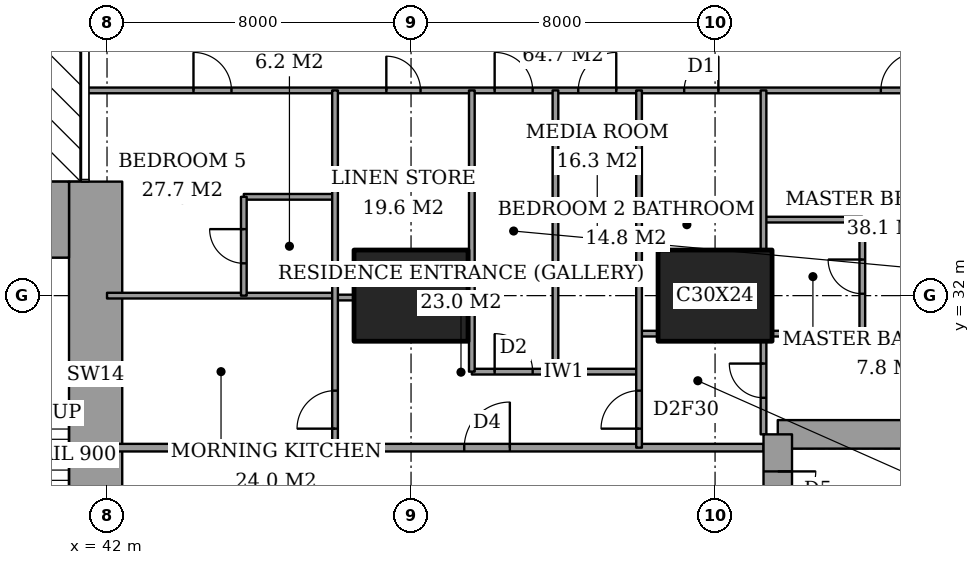
"""IFC4 building model, lengths in metres.
Left out: names, types, materials, properties, quantities, classifications, styles, units other than length and angle.
Written with IfcOpenShell. Run it as: python <this file> out.ifc"""

import sys

from ifc_helpers import new_model, si_unit, direction, frame, frame_2d, origin, origin_2d, place, context, subcontext, project, spatial, rectangle, extrude, element, fill, save


model = new_model("IFC4")
c1 = context("Model", 3, precision=1e-05, world=origin(), true_north=direction((0.0, 1.0)))
c2 = subcontext(c1, "Body", "Model", "MODEL_VIEW")
j1 = project(units=[si_unit("LENGTHUNIT", "METRE"), si_unit("PLANEANGLEUNIT", "RADIAN")], contexts=[c1])
p1 = place(None, origin())
s1 = spatial("IfcSite", under=j1, at=p1, CompositionType="ELEMENT")
p2 = place(p1, origin())
s2 = spatial("IfcBuilding", under=s1, at=p2, CompositionType="ELEMENT")
p3 = place(p2, frame((0.0, 0.0, 182.2)))
s3 = spatial("IfcBuildingStorey", under=s2, at=p3, CompositionType="ELEMENT", Elevation=182.2)
for number, where, z_axis, x_axis in (
    (1, (50.0, 32.0, 0.0), (0.0, 0.0, 1.0), (1.0, 0.0, 0.0)),
    (2, (58.0, 32.0, 0.0), (0.0, 0.0, 1.0), (1.0, 0.0, 0.0)),
):
    element("IfcColumn", number, at=place(p3, frame(where, z_axis=z_axis, x_axis=x_axis)), inside=s3, PredefinedType="COLUMN", context=c2, shape_type="SweptSolid", body=[
        extrude(rectangle(XDim=3.0, YDim=2.4, at=origin_2d()), origin(), (0.0, 0.0, 1.0), 3.6),
    ])
p4 = place(p3, frame((37.85, 34.0, 0.0), z_axis=(0.0, 0.0, 1.0), x_axis=(1.0, 0.0, 0.0)))
e3 = element("IfcWall", 3, at=p4, inside=s3, PredefinedType="SHEAR", context=c2, shape_type="SweptSolid", body=[
    extrude(rectangle(XDim=3.15, YDim=2.0, at=frame_2d((1.575, 0.0))), origin(), (0.0, 0.0, 1.0), 3.6),
])
p5 = place(p3, frame((41.7, 24.85, 0.0), z_axis=(0.0, 0.0, 1.0), x_axis=(0.0, 1.0, 0.0)))
e4 = element("IfcWall", 4, at=p5, inside=s3, PredefinedType="SHEAR", context=c2, shape_type="SweptSolid", body=[
    extrude(rectangle(XDim=10.15, YDim=1.4, at=frame_2d((5.075, 0.0))), origin(), (0.0, 0.0, 1.0), 3.6),
])
p6 = place(p3, frame((64.1, 28.35, 0.0), z_axis=(0.0, 0.0, 1.0), x_axis=(-1.0, 0.0, 0.0)))
e5 = element("IfcWall", 5, at=p6, inside=s3, PredefinedType="SHEAR", context=c2, shape_type="SweptSolid", body=[
    extrude(rectangle(XDim=4.45, YDim=0.75, at=frame_2d((2.225, 0.0))), origin(), (0.0, 0.0, 1.0), 3.6),
])
p7 = place(p3, frame((59.65, 28.35, 0.0), z_axis=(0.0, 0.0, 1.0), x_axis=(0.0, -1.0, 0.0)))
e6 = element("IfcWall", 6, at=p7, inside=s3, PredefinedType="SHEAR", context=c2, shape_type="SweptSolid", body=[
    extrude(rectangle(XDim=8.7, YDim=0.75, at=frame_2d((4.35, 0.0))), origin(), (0.0, 0.0, 1.0), 3.6),
])
p8 = place(p7, frame((0.975, 0.0, 0.0)))
e7 = element("IfcOpeningElement", 7, at=p8, cuts=e6, PredefinedType="OPENING", context=c2, shape_type="SweptSolid", body=[
    extrude(rectangle(XDim=1.0, YDim=2.1, at=frame_2d((0.5, 1.05))), frame((0.0, 0.385, 0.0), z_axis=(0.0, -1.0, 0.0), x_axis=(1.0, 0.0, 0.0)), (0.0, 0.0, 1.0), 0.77),
])
p9 = place(p3, frame((42.0, 28.0, 0.0), z_axis=(0.0, 0.0, 1.0), x_axis=(1.0, 0.0, 0.0)))
e8 = element("IfcWall", 8, at=p9, inside=s3, PredefinedType="PARTITIONING", context=c2, shape_type="SweptSolid", body=[
    extrude(rectangle(XDim=17.275, YDim=0.2, at=frame_2d((8.637, 0.0))), origin(), (0.0, 0.0, 1.0), 3.35),
])
p10 = place(p9, frame((9.4, 0.0, 0.0)))
e9 = element("IfcOpeningElement", 9, at=p10, cuts=e8, PredefinedType="OPENING", context=c2, shape_type="SweptSolid", body=[
    extrude(rectangle(XDim=1.2, YDim=2.4, at=frame_2d((0.6, 1.2))), frame((0.0, 0.11, 0.0), z_axis=(0.0, -1.0, 0.0), x_axis=(1.0, 0.0, 0.0)), (0.0, 0.0, 1.0), 0.22),
])
p11 = place(p3, frame((51.6, 30.0, 0.0), z_axis=(0.0, 0.0, 1.0), x_axis=(1.0, 0.0, 0.0)))
e10 = element("IfcWall", 10, at=p11, inside=s3, PredefinedType="PARTITIONING", context=c2, shape_type="SweptSolid", body=[
    extrude(rectangle(XDim=4.4, YDim=0.15, at=frame_2d((2.2, 0.0))), origin(), (0.0, 0.0, 1.0), 3.35),
])
p12 = place(p11, frame((0.6, 0.0, 0.0)))
e11 = element("IfcOpeningElement", 11, at=p12, cuts=e10, PredefinedType="OPENING", context=c2, shape_type="SweptSolid", body=[
    extrude(rectangle(XDim=1.0, YDim=2.1, at=frame_2d((0.5, 1.05))), frame((0.0, 0.085, 0.0), z_axis=(0.0, -1.0, 0.0), x_axis=(1.0, 0.0, 0.0)), (0.0, 0.0, 1.0), 0.17),
])
p13 = place(p3, frame((56.0, 31.0, 0.0), z_axis=(0.0, 0.0, 1.0), x_axis=(1.0, 0.0, 0.0)))
e12 = element("IfcWall", 12, at=p13, inside=s3, PredefinedType="PARTITIONING", context=c2, shape_type="SweptSolid", body=[
    extrude(rectangle(XDim=0.5, YDim=0.15, at=frame_2d((0.25, 0.0))), origin(), (0.0, 0.0, 1.0), 3.35),
])
p14 = place(p3, frame((59.5, 31.0, 0.0), z_axis=(0.0, 0.0, 1.0), x_axis=(1.0, 0.0, 0.0)))
e13 = element("IfcWall", 13, at=p14, inside=s3, PredefinedType="PARTITIONING", context=c2, shape_type="SweptSolid", body=[
    extrude(rectangle(XDim=6.95, YDim=0.15, at=frame_2d((3.475, 0.0))), origin(), (0.0, 0.0, 1.0), 3.35),
])
p15 = place(p3, frame((48.0, 31.95, 0.0), z_axis=(0.0, 0.0, 1.0), x_axis=(1.0, 0.0, 0.0)))
e14 = element("IfcWall", 14, at=p15, inside=s3, PredefinedType="PARTITIONING", context=c2, shape_type="SweptSolid", body=[
    extrude(rectangle(XDim=0.5, YDim=0.15, at=frame_2d((0.25, 0.0))), origin(), (0.0, 0.0, 1.0), 2.634),
])
p16 = place(p3, frame((42.0, 32.0, 0.0), z_axis=(0.0, 0.0, 1.0), x_axis=(1.0, 0.0, 0.0)))
e15 = element("IfcWall", 15, at=p16, inside=s3, PredefinedType="PARTITIONING", context=c2, shape_type="SweptSolid", body=[
    extrude(rectangle(XDim=6.0, YDim=0.15, at=frame_2d((3.0, 0.0))), origin(), (0.0, 0.0, 1.0), 2.634),
])
p17 = place(p3, frame((59.275, 34.0, 0.0), z_axis=(0.0, 0.0, 1.0), x_axis=(1.0, 0.0, 0.0)))
e16 = element("IfcWall", 16, at=p17, inside=s3, PredefinedType="PARTITIONING", context=c2, shape_type="SweptSolid", body=[
    extrude(rectangle(XDim=2.6, YDim=0.15, at=frame_2d((1.3, 0.0))), origin(), (0.0, 0.0, 1.0), 3.35),
])
p18 = place(p3, frame((45.6, 34.6, 0.0), z_axis=(0.0, 0.0, 1.0), x_axis=(1.0, 0.0, 0.0)))
e17 = element("IfcWall", 17, at=p18, inside=s3, PredefinedType="PARTITIONING", context=c2, shape_type="SweptSolid", body=[
    extrude(rectangle(XDim=2.4, YDim=0.15, at=frame_2d((1.2, 0.0))), origin(), (0.0, 0.0, 1.0), 3.35),
])
p19 = place(p3, frame((41.439, 37.4, 0.0), z_axis=(0.0, 0.0, 1.0), x_axis=(1.0, 0.0, 0.0)))
e18 = element("IfcWall", 18, at=p19, inside=s3, PredefinedType="PARTITIONING", context=c2, shape_type="SweptSolid", body=[
    extrude(rectangle(XDim=25.011, YDim=0.15, at=frame_2d((12.505, 0.0))), origin(), (0.0, 0.0, 1.0), 3.35),
])
p20 = place(p19, frame((10.761, 0.0, 0.0)))
e19 = element("IfcOpeningElement", 19, at=p20, cuts=e18, PredefinedType="OPENING", context=c2, shape_type="SweptSolid", body=[
    extrude(rectangle(XDim=1.0, YDim=2.1, at=frame_2d((0.5, 1.05))), frame((0.0, 0.085, 0.0), z_axis=(0.0, -1.0, 0.0), x_axis=(1.0, 0.0, 0.0)), (0.0, 0.0, 1.0), 0.17),
])
p21 = place(p19, frame((20.924, 0.0, 0.0)))
e20 = element("IfcOpeningElement", 20, at=p21, cuts=e18, PredefinedType="OPENING", context=c2, shape_type="SweptSolid", body=[
    extrude(rectangle(XDim=1.0, YDim=2.1, at=frame_2d((0.5, 1.05))), frame((0.0, 0.085, 0.0), z_axis=(0.0, -1.0, 0.0), x_axis=(1.0, 0.0, 0.0)), (0.0, 0.0, 1.0), 0.17),
])
p22 = place(p19, frame((15.749, 0.0, 0.0)))
e21 = element("IfcOpeningElement", 21, at=p22, cuts=e18, PredefinedType="OPENING", context=c2, shape_type="SweptSolid", body=[
    extrude(rectangle(XDim=0.9, YDim=2.1, at=frame_2d((0.45, 1.05))), frame((0.0, 0.085, 0.0), z_axis=(0.0, -1.0, 0.0), x_axis=(1.0, 0.0, 0.0)), (0.0, 0.0, 1.0), 0.17),
])
p23 = place(p19, frame((12.961, 0.0, 0.0)))
e22 = element("IfcOpeningElement", 22, at=p23, cuts=e18, PredefinedType="OPENING", context=c2, shape_type="SweptSolid", body=[
    extrude(rectangle(XDim=1.0, YDim=2.1, at=frame_2d((0.5, 1.05))), frame((0.0, 0.085, 0.0), z_axis=(0.0, -1.0, 0.0), x_axis=(1.0, 0.0, 0.0)), (0.0, 0.0, 1.0), 0.17),
])
p24 = place(p19, frame((7.911, 0.0, 0.0)))
e23 = element("IfcOpeningElement", 23, at=p24, cuts=e18, PredefinedType="OPENING", context=c2, shape_type="SweptSolid", body=[
    extrude(rectangle(XDim=0.9, YDim=2.1, at=frame_2d((0.45, 1.05))), frame((0.0, 0.085, 0.0), z_axis=(0.0, -1.0, 0.0), x_axis=(1.0, 0.0, 0.0)), (0.0, 0.0, 1.0), 0.17),
])
p25 = place(p19, frame((2.836, 0.0, 0.0)))
e24 = element("IfcOpeningElement", 24, at=p25, cuts=e18, PredefinedType="OPENING", context=c2, shape_type="SweptSolid", body=[
    extrude(rectangle(XDim=1.0, YDim=2.1, at=frame_2d((0.5, 1.05))), frame((0.0, 0.085, 0.0), z_axis=(0.0, -1.0, 0.0), x_axis=(1.0, 0.0, 0.0)), (0.0, 0.0, 1.0), 0.17),
])
p26 = place(p3, frame((45.6, 32.0, 0.0), z_axis=(0.0, 0.0, 1.0), x_axis=(0.0, 1.0, 0.0)))
e25 = element("IfcWall", 25, at=p26, inside=s3, PredefinedType="PARTITIONING", context=c2, shape_type="SweptSolid", body=[
    extrude(rectangle(XDim=2.6, YDim=0.15, at=frame_2d((1.3, 0.0))), origin(), (0.0, 0.0, 1.0), 3.35),
])
p27 = place(p26, frame((0.85, 0.0, 0.0)))
e26 = element("IfcOpeningElement", 26, at=p27, cuts=e25, PredefinedType="OPENING", context=c2, shape_type="SweptSolid", body=[
    extrude(rectangle(XDim=0.9, YDim=2.1, at=frame_2d((0.45, 1.05))), frame((0.0, 0.085, 0.0), z_axis=(0.0, -1.0, 0.0), x_axis=(1.0, 0.0, 0.0)), (0.0, 0.0, 1.0), 0.17),
])
p28 = place(p3, frame((48.0, 28.0, 0.0), z_axis=(0.0, 0.0, 1.0), x_axis=(0.0, 1.0, 0.0)))
e27 = element("IfcWall", 27, at=p28, inside=s3, PredefinedType="PARTITIONING", context=c2, shape_type="SweptSolid", body=[
    extrude(rectangle(XDim=9.4, YDim=0.15, at=frame_2d((4.7, 0.0))), origin(), (0.0, 0.0, 1.0), 3.35),
])
p29 = place(p28, frame((0.5, 0.0, 0.0)))
e28 = element("IfcOpeningElement", 28, at=p29, cuts=e27, PredefinedType="OPENING", context=c2, shape_type="SweptSolid", body=[
    extrude(rectangle(XDim=1.0, YDim=2.1, at=frame_2d((0.5, 1.05))), frame((0.0, 0.085, 0.0), z_axis=(0.0, -1.0, 0.0), x_axis=(1.0, 0.0, 0.0)), (0.0, 0.0, 1.0), 0.17),
])
for number, where, z_axis, x_axis in (
    (29, (51.6, 30.0, 0.0), (0.0, 0.0, 1.0), (0.0, 1.0, 0.0)),
    (30, (53.8, 30.0, 0.0), (0.0, 0.0, 1.0), (0.0, 1.0, 0.0)),
):
    element("IfcWall", number, at=place(p3, frame(where, z_axis=z_axis, x_axis=x_axis)), inside=s3, PredefinedType="PARTITIONING", context=c2, shape_type="SweptSolid", body=[
        extrude(rectangle(XDim=7.4, YDim=0.15, at=frame_2d((3.7, 0.0))), origin(), (0.0, 0.0, 1.0), 3.35),
    ])
p30 = place(p3, frame((56.0, 28.0, 0.0), z_axis=(0.0, 0.0, 1.0), x_axis=(0.0, 1.0, 0.0)))
e31 = element("IfcWall", 31, at=p30, inside=s3, PredefinedType="PARTITIONING", context=c2, shape_type="SweptSolid", body=[
    extrude(rectangle(XDim=9.4, YDim=0.15, at=frame_2d((4.7, 0.0))), origin(), (0.0, 0.0, 1.0), 3.35),
])
p31 = place(p30, frame((0.5, 0.0, 0.0)))
e32 = element("IfcOpeningElement", 32, at=p31, cuts=e31, PredefinedType="OPENING", context=c2, shape_type="SweptSolid", body=[
    extrude(rectangle(XDim=1.0, YDim=2.1, at=frame_2d((0.5, 1.05))), frame((0.0, 0.085, 0.0), z_axis=(0.0, -1.0, 0.0), x_axis=(1.0, 0.0, 0.0)), (0.0, 0.0, 1.0), 0.17),
])
p32 = place(p3, frame((59.275, 28.35, 0.0), z_axis=(0.0, 0.0, 1.0), x_axis=(0.0, 1.0, 0.0)))
e33 = element("IfcWall", 33, at=p32, inside=s3, PredefinedType="PARTITIONING", context=c2, shape_type="SweptSolid", body=[
    extrude(rectangle(XDim=2.45, YDim=0.15, at=frame_2d((1.225, 0.0))), origin(), (0.0, 0.0, 1.0), 3.35),
])
p33 = place(p32, frame((0.962, 0.0, 0.0)))
e34 = element("IfcOpeningElement", 34, at=p33, cuts=e33, PredefinedType="OPENING", context=c2, shape_type="SweptSolid", body=[
    extrude(rectangle(XDim=0.9, YDim=2.1, at=frame_2d((0.45, 1.05))), frame((0.0, 0.085, 0.0), z_axis=(0.0, -1.0, 0.0), x_axis=(1.0, 0.0, 0.0)), (0.0, 0.0, 1.0), 0.17),
])
p34 = place(p3, frame((59.275, 33.2, 0.0), z_axis=(0.0, 0.0, 1.0), x_axis=(0.0, 1.0, 0.0)))
e35 = element("IfcWall", 35, at=p34, inside=s3, PredefinedType="PARTITIONING", context=c2, shape_type="SweptSolid", body=[
    extrude(rectangle(XDim=4.2, YDim=0.15, at=frame_2d((2.1, 0.0))), origin(), (0.0, 0.0, 1.0), 3.35),
])
p35 = place(p3, frame((61.875, 31.0, 0.0), z_axis=(0.0, 0.0, 1.0), x_axis=(0.0, 1.0, 0.0)))
e36 = element("IfcWall", 36, at=p35, inside=s3, PredefinedType="PARTITIONING", context=c2, shape_type="SweptSolid", body=[
    extrude(rectangle(XDim=3.0, YDim=0.15, at=frame_2d((1.5, 0.0))), origin(), (0.0, 0.0, 1.0), 3.35),
])
p36 = place(p35, frame((1.05, 0.0, 0.0)))
e37 = element("IfcOpeningElement", 37, at=p36, cuts=e36, PredefinedType="OPENING", context=c2, shape_type="SweptSolid", body=[
    extrude(rectangle(XDim=0.9, YDim=2.1, at=frame_2d((0.45, 1.05))), frame((0.0, 0.085, 0.0), z_axis=(0.0, -1.0, 0.0), x_axis=(1.0, 0.0, 0.0)), (0.0, 0.0, 1.0), 0.17),
])
p37 = place(p20, origin())
e38 = element("IfcDoor", 38, at=p37, inside=s3, OperationType="SINGLE_SWING_RIGHT", PredefinedType="DOOR", context=c2, shape_type="SweptSolid", body=[
    extrude(rectangle(XDim=1.0, YDim=2.1, at=frame_2d((0.5, 1.05))), frame((0.0, 0.025, 0.0), z_axis=(0.0, -1.0, 0.0), x_axis=(1.0, 0.0, 0.0)), (0.0, 0.0, 1.0), 0.05),
])
fill(e19, e38)
p38 = place(p36, origin())
e39 = element("IfcDoor", 39, at=p38, inside=s3, OperationType="SINGLE_SWING_LEFT", PredefinedType="DOOR", context=c2, shape_type="SweptSolid", body=[
    extrude(rectangle(XDim=0.9, YDim=2.1, at=frame_2d((0.45, 1.05))), frame((0.0, 0.025, 0.0), z_axis=(0.0, -1.0, 0.0), x_axis=(1.0, 0.0, 0.0)), (0.0, 0.0, 1.0), 0.05),
])
fill(e37, e39)
p39 = place(p21, origin())
e40 = element("IfcDoor", 40, at=p39, inside=s3, OperationType="SINGLE_SWING_LEFT", PredefinedType="DOOR", context=c2, shape_type="SweptSolid", body=[
    extrude(rectangle(XDim=1.0, YDim=2.1, at=frame_2d((0.5, 1.05))), frame((0.0, 0.025, 0.0), z_axis=(0.0, -1.0, 0.0), x_axis=(1.0, 0.0, 0.0)), (0.0, 0.0, 1.0), 0.05),
])
fill(e20, e40)
p40 = place(p33, origin())
e41 = element("IfcDoor", 41, at=p40, inside=s3, OperationType="SINGLE_SWING_LEFT", PredefinedType="DOOR", context=c2, shape_type="SweptSolid", body=[
    extrude(rectangle(XDim=0.9, YDim=2.1, at=frame_2d((0.45, 1.05))), frame((0.0, 0.025, 0.0), z_axis=(0.0, -1.0, 0.0), x_axis=(1.0, 0.0, 0.0)), (0.0, 0.0, 1.0), 0.05),
])
fill(e34, e41)
p41 = place(p22, origin())
e42 = element("IfcDoor", 42, at=p41, inside=s3, OperationType="SINGLE_SWING_LEFT", PredefinedType="DOOR", context=c2, shape_type="SweptSolid", body=[
    extrude(rectangle(XDim=0.9, YDim=2.1, at=frame_2d((0.45, 1.05))), frame((0.0, 0.025, 0.0), z_axis=(0.0, -1.0, 0.0), x_axis=(1.0, 0.0, 0.0)), (0.0, 0.0, 1.0), 0.05),
])
fill(e21, e42)
p42 = place(p31, origin())
e43 = element("IfcDoor", 43, at=p42, inside=s3, OperationType="SINGLE_SWING_RIGHT", PredefinedType="DOOR", context=c2, shape_type="SweptSolid", body=[
    extrude(rectangle(XDim=1.0, YDim=2.1, at=frame_2d((0.5, 1.05))), frame((0.0, 0.025, 0.0), z_axis=(0.0, -1.0, 0.0), x_axis=(1.0, 0.0, 0.0)), (0.0, 0.0, 1.0), 0.05),
])
fill(e32, e43)
p43 = place(p10, origin())
e44 = element("IfcDoor", 44, at=p43, inside=s3, OperationType="SINGLE_SWING_LEFT", PredefinedType="DOOR", context=c2, shape_type="SweptSolid", body=[
    extrude(rectangle(XDim=1.2, YDim=2.4, at=frame_2d((0.6, 1.2))), frame((0.0, 0.025, 0.0), z_axis=(0.0, -1.0, 0.0), x_axis=(1.0, 0.0, 0.0)), (0.0, 0.0, 1.0), 0.05),
])
fill(e9, e44)
p44 = place(p23, origin())
e45 = element("IfcDoor", 45, at=p44, inside=s3, OperationType="SINGLE_SWING_LEFT", PredefinedType="DOOR", context=c2, shape_type="SweptSolid", body=[
    extrude(rectangle(XDim=1.0, YDim=2.1, at=frame_2d((0.5, 1.05))), frame((0.0, 0.025, 0.0), z_axis=(0.0, -1.0, 0.0), x_axis=(1.0, 0.0, 0.0)), (0.0, 0.0, 1.0), 0.05),
])
fill(e22, e45)
p45 = place(p12, origin())
e46 = element("IfcDoor", 46, at=p45, inside=s3, OperationType="SINGLE_SWING_RIGHT", PredefinedType="DOOR", context=c2, shape_type="SweptSolid", body=[
    extrude(rectangle(XDim=1.0, YDim=2.1, at=frame_2d((0.5, 1.05))), frame((0.0, 0.025, 0.0), z_axis=(0.0, -1.0, 0.0), x_axis=(1.0, 0.0, 0.0)), (0.0, 0.0, 1.0), 0.05),
])
fill(e11, e46)
p46 = place(p24, origin())
e47 = element("IfcDoor", 47, at=p46, inside=s3, OperationType="SINGLE_SWING_RIGHT", PredefinedType="DOOR", context=c2, shape_type="SweptSolid", body=[
    extrude(rectangle(XDim=0.9, YDim=2.1, at=frame_2d((0.45, 1.05))), frame((0.0, 0.025, 0.0), z_axis=(0.0, -1.0, 0.0), x_axis=(1.0, 0.0, 0.0)), (0.0, 0.0, 1.0), 0.05),
])
fill(e23, e47)
p47 = place(p27, origin())
e48 = element("IfcDoor", 48, at=p47, inside=s3, OperationType="SINGLE_SWING_LEFT", PredefinedType="DOOR", context=c2, shape_type="SweptSolid", body=[
    extrude(rectangle(XDim=0.9, YDim=2.1, at=frame_2d((0.45, 1.05))), frame((0.0, 0.025, 0.0), z_axis=(0.0, -1.0, 0.0), x_axis=(1.0, 0.0, 0.0)), (0.0, 0.0, 1.0), 0.05),
])
fill(e26, e48)
p48 = place(p25, origin())
e49 = element("IfcDoor", 49, at=p48, inside=s3, OperationType="SINGLE_SWING_RIGHT", PredefinedType="DOOR", context=c2, shape_type="SweptSolid", body=[
    extrude(rectangle(XDim=1.0, YDim=2.1, at=frame_2d((0.5, 1.05))), frame((0.0, 0.025, 0.0), z_axis=(0.0, -1.0, 0.0), x_axis=(1.0, 0.0, 0.0)), (0.0, 0.0, 1.0), 0.05),
])
fill(e24, e49)
p49 = place(p29, origin())
e50 = element("IfcDoor", 50, at=p49, inside=s3, OperationType="SINGLE_SWING_RIGHT", PredefinedType="DOOR", context=c2, shape_type="SweptSolid", body=[
    extrude(rectangle(XDim=1.0, YDim=2.1, at=frame_2d((0.5, 1.05))), frame((0.0, 0.025, 0.0), z_axis=(0.0, -1.0, 0.0), x_axis=(1.0, 0.0, 0.0)), (0.0, 0.0, 1.0), 0.05),
])
fill(e28, e50)
p50 = place(p8, origin())
e51 = element("IfcDoor", 51, at=p50, inside=s3, OperationType="SINGLE_SWING_RIGHT", PredefinedType="DOOR", context=c2, shape_type="SweptSolid", body=[
    extrude(rectangle(XDim=1.0, YDim=2.1, at=frame_2d((0.5, 1.05))), frame((0.0, 0.025, 0.0), z_axis=(0.0, -1.0, 0.0), x_axis=(1.0, 0.0, 0.0)), (0.0, 0.0, 1.0), 0.05),
])
fill(e7, e51)
save(model, sys.argv[1])
